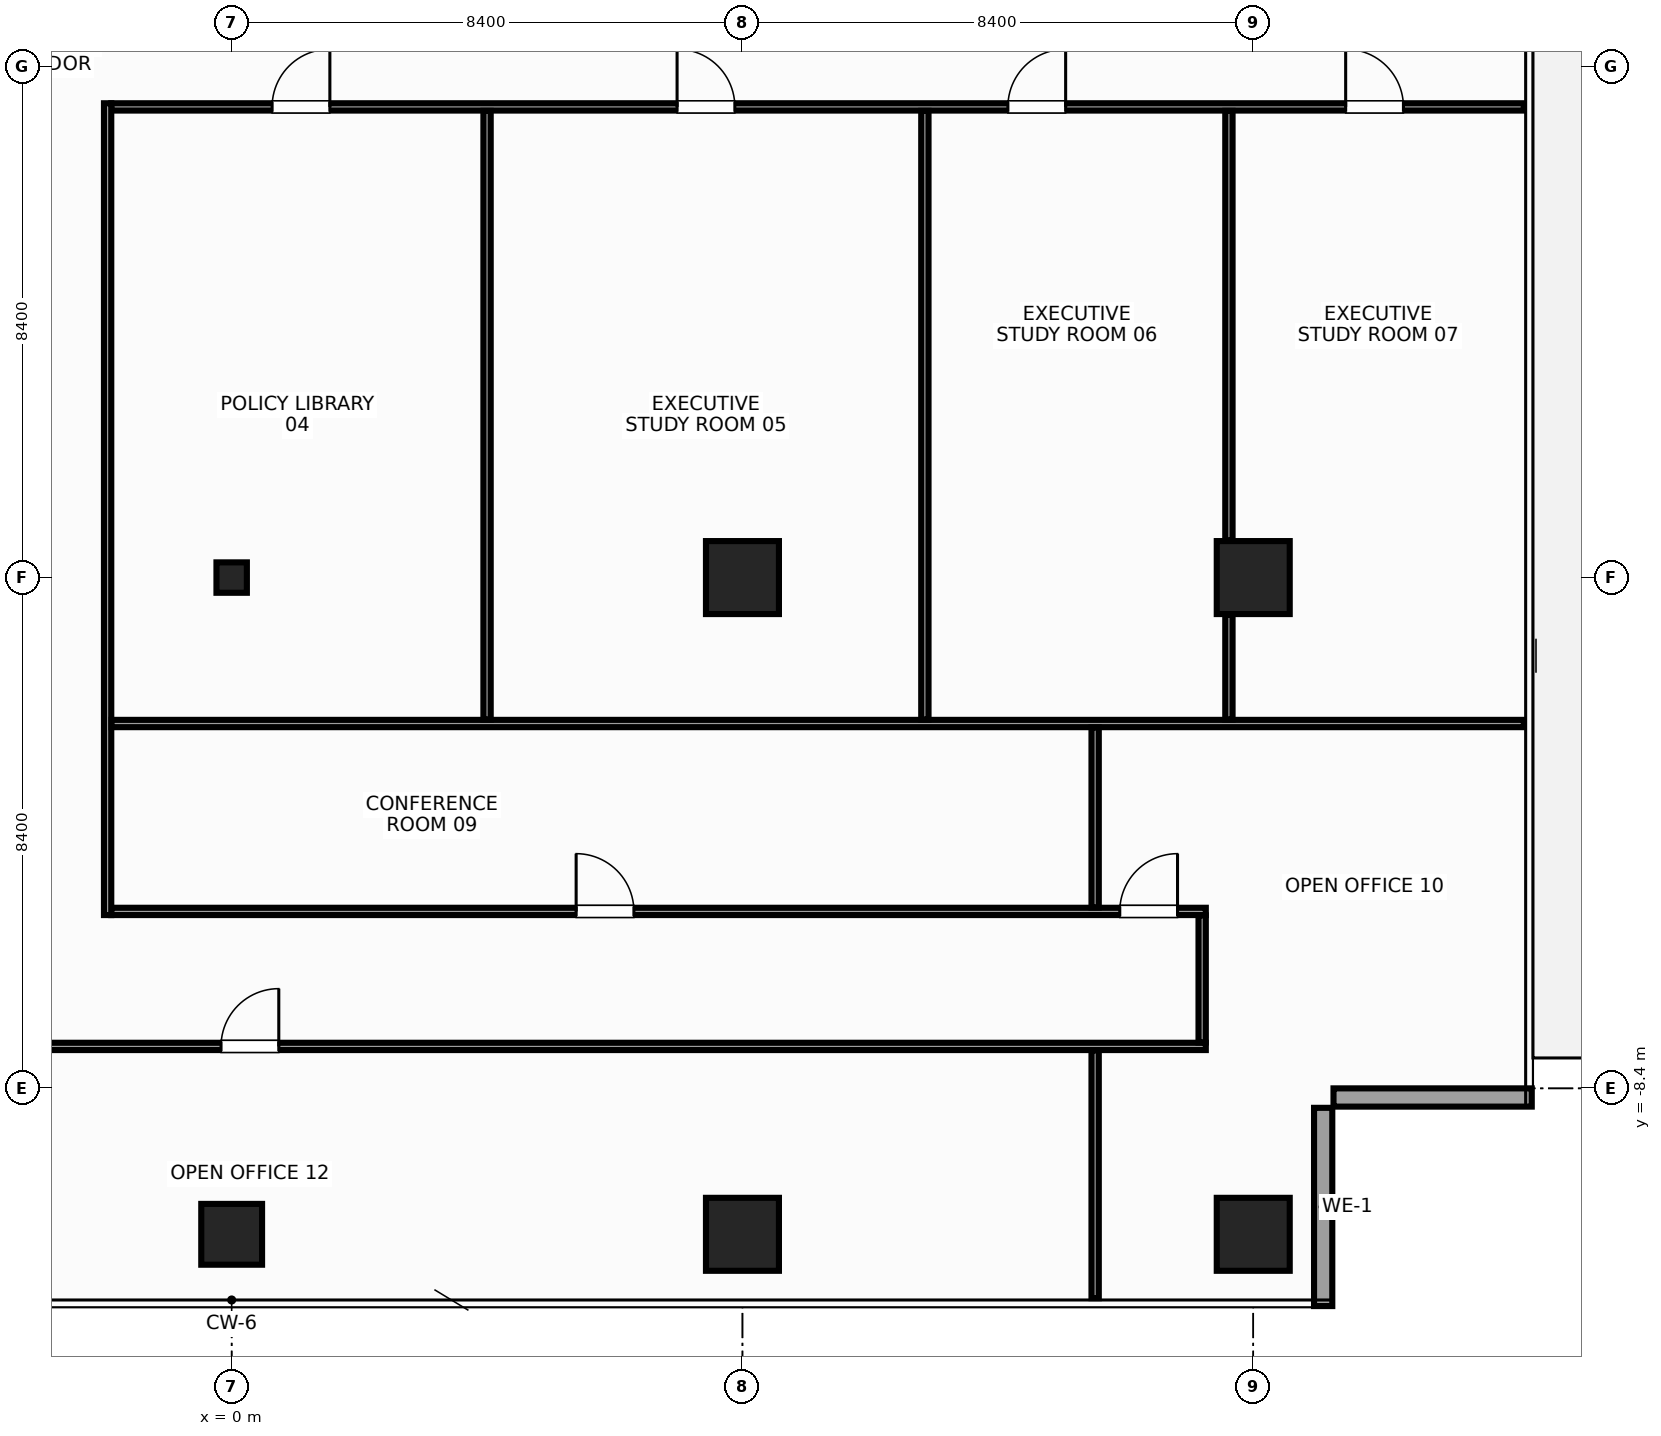
"""IFC4 building model, lengths in metres.
Left out: names, types, materials, properties, quantities, classifications, styles, units other than length and angle.
Written with IfcOpenShell. Run it as: python <this file> out.ifc"""

import sys

from ifc_helpers import new_model, si_unit, direction, frame, frame_2d, origin, origin_with_axes, origin_2d, place, context, subcontext, project, spatial, rectangle, hollow_rectangle, extrude, source, transform, mapped, element, fill, save


model = new_model("IFC4")
c1 = context("Model", 3, precision=1e-05, world=origin(), true_north=direction((0.0, 1.0)))
c2 = subcontext(c1, "Body", "Model", "MODEL_VIEW")
j1 = project(units=[si_unit("LENGTHUNIT", "METRE"), si_unit("PLANEANGLEUNIT", "RADIAN")], contexts=[c1])
p1 = place(None, origin())
s1 = spatial("IfcSite", under=j1, at=p1, CompositionType="ELEMENT")
p2 = place(p1, origin())
s2 = spatial("IfcBuilding", under=s1, at=p2, CompositionType="ELEMENT")
p3 = place(p2, frame((0.0, 0.0, 272.0)))
s3 = spatial("IfcBuildingStorey", under=s2, at=p3, CompositionType="ELEMENT", Elevation=272.0)
m1 = source(origin(), c2, "Body", "SweptSolid", [
    extrude(rectangle(XDim=1.2, YDim=1.2, at=origin_2d()), origin(), (0.0, 0.0, 1.0), 3.6),
])
for number, where, z_axis, x_axis in (
    (1, (16.8, -10.8, 0.0), (0.0, 0.0, 1.0), (1.0, 0.0, 0.0)),
    (2, (16.8, 0.0, 0.0), (0.0, 0.0, 1.0), (1.0, 0.0, 0.0)),
    (3, (8.4, 0.0, 0.0), (0.0, 0.0, 1.0), (1.0, 0.0, 0.0)),
    (4, (8.4, -10.8, 0.0), (0.0, 0.0, 1.0), (1.0, 0.0, 0.0)),
):
    element("IfcColumn", number, at=place(p3, frame(where, z_axis=z_axis, x_axis=x_axis)), inside=s3, PredefinedType="COLUMN", context=c2, shape_type="MappedRepresentation", body=[
        mapped(m1, transform((0.0, 0.0, 0.0), x_axis=(1.0, 0.0, 0.0), y_axis=(0.0, 1.0, 0.0), z_axis=(0.0, 0.0, 1.0), scale=1.0)),
    ])
m2 = source(origin(), c2, "Body", "SweptSolid", [
    extrude(rectangle(XDim=1.0, YDim=1.0, at=origin_2d()), origin(), (0.0, 0.0, 1.0), 3.6),
])
p4 = place(p3, frame((0.0, -10.8, 0.0), z_axis=(0.0, 0.0, 1.0), x_axis=(1.0, 0.0, 0.0)))
e5 = element("IfcColumn", 5, at=p4, inside=s3, PredefinedType="COLUMN", context=c2, shape_type="MappedRepresentation", body=[
    mapped(m2, transform((0.0, 0.0, 0.0), x_axis=(1.0, 0.0, 0.0), y_axis=(0.0, 1.0, 0.0), z_axis=(0.0, 0.0, 1.0), scale=1.0)),
])
m3 = source(origin(), c2, "Body", "SweptSolid", [
    extrude(hollow_rectangle(XDim=0.5, YDim=0.5, WallThickness=0.025, at=origin_2d()), origin(), (0.0, 0.0, 1.0), 3.6),
])
p5 = place(p3, origin_with_axes())
e6 = element("IfcColumn", 6, at=p5, inside=s3, PredefinedType="COLUMN", context=c2, shape_type="MappedRepresentation", body=[
    mapped(m3, transform((0.0, 0.0, 0.0), x_axis=(1.0, 0.0, 0.0), y_axis=(0.0, 1.0, 0.0), z_axis=(0.0, 0.0, 1.0), scale=1.0)),
])
m4 = source(origin(), c2, "Body", "SweptSolid", [
    extrude(rectangle(XDim=3.26, YDim=0.3, at=frame_2d((1.63, 0.0))), origin(), (0.0, 0.0, 1.0), 2.75),
])
p6 = place(p3, frame((17.95, -11.98, 0.0), z_axis=(0.0, 0.0, 1.0), x_axis=(0.0, 1.0, 0.0)))
e7 = element("IfcWall", 7, at=p6, inside=s3, PredefinedType="STANDARD", context=c2, shape_type="MappedRepresentation", body=[
    mapped(m4, transform((0.0, 0.0, 0.0), x_axis=(1.0, 0.0, 0.0), y_axis=(0.0, 1.0, 0.0), z_axis=(0.0, 0.0, 1.0), scale=1.0)),
])
m5 = source(origin(), c2, "Body", "SweptSolid", [
    extrude(rectangle(XDim=3.26, YDim=0.3, at=frame_2d((1.63, 0.0))), origin(), (0.0, 0.0, 1.0), 2.75),
])
p7 = place(p3, frame((18.12, -8.55, 0.0), z_axis=(0.0, 0.0, 1.0), x_axis=(1.0, 0.0, 0.0)))
e8 = element("IfcWall", 8, at=p7, inside=s3, PredefinedType="STANDARD", context=c2, shape_type="MappedRepresentation", body=[
    mapped(m5, transform((0.0, 0.0, 0.0), x_axis=(1.0, 0.0, 0.0), y_axis=(0.0, 1.0, 0.0), z_axis=(0.0, 0.0, 1.0), scale=1.0)),
])
m6 = source(origin(), c2, "Body", "SweptSolid", [
    extrude(rectangle(XDim=23.23, YDim=0.12, at=frame_2d((11.615, 0.0))), origin(), (0.0, 0.0, 1.0), 2.755),
])
p8 = place(p3, frame((-1.98, 7.74, 0.0), z_axis=(0.0, 0.0, 1.0), x_axis=(1.0, 0.0, 0.0)))
e9 = element("IfcWall", 9, at=p8, inside=s3, PredefinedType="PARTITIONING", context=c2, shape_type="MappedRepresentation", body=[
    mapped(m6, transform((0.0, 0.0, 0.0), x_axis=(1.0, 0.0, 0.0), y_axis=(0.0, 1.0, 0.0), z_axis=(0.0, 0.0, 1.0), scale=1.0)),
])
p9 = place(p8, frame((2.645, 0.0, 0.0)))
e10 = element("IfcOpeningElement", 10, at=p9, cuts=e9, PredefinedType="OPENING", context=c2, shape_type="SweptSolid", body=[
    extrude(rectangle(XDim=0.95, YDim=2.15, at=frame_2d((0.475, 1.075))), frame((0.0, 0.072, 0.0), z_axis=(0.0, -1.0, 0.0), x_axis=(1.0, 0.0, 0.0)), (0.0, 0.0, 1.0), 0.144),
])
p10 = place(p8, frame((9.305, 0.0, 0.0)))
e11 = element("IfcOpeningElement", 11, at=p10, cuts=e9, PredefinedType="OPENING", context=c2, shape_type="SweptSolid", body=[
    extrude(rectangle(XDim=0.95, YDim=2.15, at=frame_2d((0.475, 1.075))), frame((0.0, 0.072, 0.0), z_axis=(0.0, -1.0, 0.0), x_axis=(1.0, 0.0, 0.0)), (0.0, 0.0, 1.0), 0.144),
])
p11 = place(p8, frame((14.745, 0.0, 0.0)))
e12 = element("IfcOpeningElement", 12, at=p11, cuts=e9, PredefinedType="OPENING", context=c2, shape_type="SweptSolid", body=[
    extrude(rectangle(XDim=0.95, YDim=2.15, at=frame_2d((0.475, 1.075))), frame((0.0, 0.072, 0.0), z_axis=(0.0, -1.0, 0.0), x_axis=(1.0, 0.0, 0.0)), (0.0, 0.0, 1.0), 0.144),
])
p12 = place(p8, frame((20.3, 0.0, 0.0)))
e13 = element("IfcOpeningElement", 13, at=p12, cuts=e9, PredefinedType="OPENING", context=c2, shape_type="SweptSolid", body=[
    extrude(rectangle(XDim=0.95, YDim=2.15, at=frame_2d((0.475, 1.075))), frame((0.0, 0.072, 0.0), z_axis=(0.0, -1.0, 0.0), x_axis=(1.0, 0.0, 0.0)), (0.0, 0.0, 1.0), 0.144),
])
m7 = source(origin(), c2, "Body", "SweptSolid", [
    extrude(rectangle(XDim=18.0, YDim=0.12, at=frame_2d((9.0, 0.0))), origin(), (0.0, 0.0, 1.0), 2.755),
])
p13 = place(p3, frame((-1.98, -5.49, 0.0), z_axis=(0.0, 0.0, 1.0), x_axis=(1.0, 0.0, 0.0)))
e14 = element("IfcWall", 14, at=p13, inside=s3, PredefinedType="PARTITIONING", context=c2, shape_type="MappedRepresentation", body=[
    mapped(m7, transform((0.0, 0.0, 0.0), x_axis=(1.0, 0.0, 0.0), y_axis=(0.0, 1.0, 0.0), z_axis=(0.0, 0.0, 1.0), scale=1.0)),
])
p14 = place(p13, frame((7.645, 0.0, 0.0)))
e15 = element("IfcOpeningElement", 15, at=p14, cuts=e14, PredefinedType="OPENING", context=c2, shape_type="SweptSolid", body=[
    extrude(rectangle(XDim=0.95, YDim=2.15, at=frame_2d((0.475, 1.075))), frame((0.0, 0.072, 0.0), z_axis=(0.0, -1.0, 0.0), x_axis=(1.0, 0.0, 0.0)), (0.0, 0.0, 1.0), 0.144),
])
p15 = place(p13, frame((16.585, 0.0, 0.0)))
e16 = element("IfcOpeningElement", 16, at=p15, cuts=e14, PredefinedType="OPENING", context=c2, shape_type="SweptSolid", body=[
    extrude(rectangle(XDim=0.95, YDim=2.15, at=frame_2d((0.475, 1.075))), frame((0.0, 0.072, 0.0), z_axis=(0.0, -1.0, 0.0), x_axis=(1.0, 0.0, 0.0)), (0.0, 0.0, 1.0), 0.144),
])
m8 = source(origin(), c2, "Body", "SweptSolid", [
    extrude(rectangle(XDim=32.04, YDim=0.12, at=frame_2d((16.02, 0.0))), origin(), (0.0, 0.0, 1.0), 2.755),
])
p16 = place(p3, frame((-16.02, -7.71, 0.0), z_axis=(0.0, 0.0, 1.0), x_axis=(1.0, 0.0, 0.0)))
e17 = element("IfcWall", 17, at=p16, inside=s3, PredefinedType="PARTITIONING", context=c2, shape_type="MappedRepresentation", body=[
    mapped(m8, transform((0.0, 0.0, 0.0), x_axis=(1.0, 0.0, 0.0), y_axis=(0.0, 1.0, 0.0), z_axis=(0.0, 0.0, 1.0), scale=1.0)),
])
p17 = place(p16, frame((15.845, 0.0, 0.0)))
e18 = element("IfcOpeningElement", 18, at=p17, cuts=e17, PredefinedType="OPENING", context=c2, shape_type="SweptSolid", body=[
    extrude(rectangle(XDim=0.95, YDim=2.15, at=frame_2d((0.475, 1.075))), frame((0.0, 0.072, 0.0), z_axis=(0.0, -1.0, 0.0), x_axis=(1.0, 0.0, 0.0)), (0.0, 0.0, 1.0), 0.144),
])
m9 = source(origin(), c2, "Body", "SweptSolid", [
    extrude(rectangle(XDim=13.35, YDim=0.12, at=frame_2d((6.675, 0.0))), origin(), (0.0, 0.0, 1.0), 2.655),
])
p18 = place(p3, frame((-2.04, -5.55, 0.0), z_axis=(0.0, 0.0, 1.0), x_axis=(0.0, 1.0, 0.0)))
e19 = element("IfcWall", 19, at=p18, inside=s3, PredefinedType="PARTITIONING", context=c2, shape_type="MappedRepresentation", body=[
    mapped(m9, transform((0.0, 0.0, 0.0), x_axis=(1.0, 0.0, 0.0), y_axis=(0.0, 1.0, 0.0), z_axis=(0.0, 0.0, 1.0), scale=1.0)),
])
m10 = source(origin(), c2, "Body", "SweptSolid", [
    extrude(rectangle(XDim=2.09, YDim=0.12, at=frame_2d((1.045, 0.0))), origin(), (0.0, 0.0, 1.0), 3.37),
])
p19 = place(p3, frame((15.96, -7.645, 0.0), z_axis=(0.0, 0.0, 1.0), x_axis=(0.0, 1.0, 0.0)))
e20 = element("IfcWall", 20, at=p19, inside=s3, PredefinedType="PARTITIONING", context=c2, shape_type="MappedRepresentation", body=[
    mapped(m10, transform((0.0, 0.0, 0.0), x_axis=(1.0, 0.0, 0.0), y_axis=(0.0, 1.0, 0.0), z_axis=(0.0, 0.0, 1.0), scale=1.0)),
])
m11 = source(origin(), c2, "Body", "SweptSolid", [
    extrude(rectangle(XDim=23.225, YDim=0.12, at=frame_2d((11.613, 0.0))), origin(), (0.0, 0.0, 1.0), 2.755),
])
p20 = place(p3, frame((-1.975, -2.4, 0.0), z_axis=(0.0, 0.0, 1.0), x_axis=(1.0, 0.0, 0.0)))
e21 = element("IfcWall", 21, at=p20, inside=s3, PredefinedType="PARTITIONING", context=c2, shape_type="MappedRepresentation", body=[
    mapped(m11, transform((0.0, 0.0, 0.0), x_axis=(1.0, 0.0, 0.0), y_axis=(0.0, 1.0, 0.0), z_axis=(0.0, 0.0, 1.0), scale=1.0)),
])
m12 = source(origin(), c2, "Body", "SweptSolid", [
    extrude(rectangle(XDim=10.01, YDim=0.12, at=frame_2d((5.005, 0.0))), origin(), (0.0, 0.0, 1.0), 2.655),
])
for number, where, z_axis, x_axis in (
    (22, (4.2, -2.335, 0.0), (0.0, 0.0, 1.0), (0.0, 1.0, 0.0)),
    (23, (11.4, -2.335, 0.0), (0.0, 0.0, 1.0), (0.0, 1.0, 0.0)),
):
    element("IfcWall", number, at=place(p3, frame(where, z_axis=z_axis, x_axis=x_axis)), inside=s3, PredefinedType="PARTITIONING", context=c2, shape_type="MappedRepresentation", body=[
        mapped(m12, transform((0.0, 0.0, 0.0), x_axis=(1.0, 0.0, 0.0), y_axis=(0.0, 1.0, 0.0), z_axis=(0.0, 0.0, 1.0), scale=1.0)),
    ])
m13 = source(origin(), c2, "Body", "SweptSolid", [
    extrude(rectangle(XDim=1.725, YDim=0.12, at=frame_2d((0.862, 0.0))), origin(), (0.0, 0.0, 1.0), 3.37),
])
p21 = place(p3, frame((16.4, -2.335, 0.0), z_axis=(0.0, 0.0, 1.0), x_axis=(0.0, 1.0, 0.0)))
e24 = element("IfcWall", 24, at=p21, inside=s3, PredefinedType="PARTITIONING", context=c2, shape_type="MappedRepresentation", body=[
    mapped(m13, transform((0.0, 0.0, 0.0), x_axis=(1.0, 0.0, 0.0), y_axis=(0.0, 1.0, 0.0), z_axis=(0.0, 0.0, 1.0), scale=1.0)),
])
m14 = source(origin(), c2, "Body", "SweptSolid", [
    extrude(rectangle(XDim=7.065, YDim=0.12, at=frame_2d((3.532, 0.0))), origin(), (0.0, 0.0, 1.0), 2.655),
])
p22 = place(p3, frame((16.4, 0.61, 0.0), z_axis=(0.0, 0.0, 1.0), x_axis=(0.0, 1.0, 0.0)))
e25 = element("IfcWall", 25, at=p22, inside=s3, PredefinedType="PARTITIONING", context=c2, shape_type="MappedRepresentation", body=[
    mapped(m14, transform((0.0, 0.0, 0.0), x_axis=(1.0, 0.0, 0.0), y_axis=(0.0, 1.0, 0.0), z_axis=(0.0, 0.0, 1.0), scale=1.0)),
])
m15 = source(origin(), c2, "Body", "SweptSolid", [
    extrude(rectangle(XDim=4.075, YDim=0.12, at=frame_2d((2.038, 0.0))), origin(), (0.0, 0.0, 1.0), 2.905),
])
p23 = place(p3, frame((14.2, -11.85, 0.0), z_axis=(0.0, 0.0, 1.0), x_axis=(0.0, 1.0, 0.0)))
e26 = element("IfcWall", 26, at=p23, inside=s3, PredefinedType="PARTITIONING", context=c2, shape_type="MappedRepresentation", body=[
    mapped(m15, transform((0.0, 0.0, 0.0), x_axis=(1.0, 0.0, 0.0), y_axis=(0.0, 1.0, 0.0), z_axis=(0.0, 0.0, 1.0), scale=1.0)),
])
m16 = source(origin(), c2, "Body", "SweptSolid", [
    extrude(rectangle(XDim=2.96, YDim=0.12, at=frame_2d((1.48, 0.0))), origin(), (0.0, 0.0, 1.0), 3.37),
])
p24 = place(p3, frame((14.2, -5.425, 0.0), z_axis=(0.0, 0.0, 1.0), x_axis=(0.0, 1.0, 0.0)))
e27 = element("IfcWall", 27, at=p24, inside=s3, PredefinedType="PARTITIONING", context=c2, shape_type="MappedRepresentation", body=[
    mapped(m16, transform((0.0, 0.0, 0.0), x_axis=(1.0, 0.0, 0.0), y_axis=(0.0, 1.0, 0.0), z_axis=(0.0, 0.0, 1.0), scale=1.0)),
])
m17 = source(origin(), c2, "Body", "SweptSolid", [
    extrude(rectangle(XDim=0.95, YDim=2.15, at=frame_2d((0.475, 1.075))), frame((0.0, 0.025, 0.0), z_axis=(0.0, -1.0, 0.0), x_axis=(1.0, 0.0, 0.0)), (0.0, 0.0, 1.0), 0.05),
])
p25 = place(p9, origin())
e28 = element("IfcDoor", 28, at=p25, inside=s3, OperationType="SINGLE_SWING_RIGHT", PredefinedType="DOOR", context=c2, shape_type="MappedRepresentation", body=[
    mapped(m17, transform((0.0, 0.0, 0.0), x_axis=(1.0, 0.0, 0.0), y_axis=(0.0, 1.0, 0.0), z_axis=(0.0, 0.0, 1.0), scale=1.0)),
])
fill(e10, e28)
p26 = place(p10, origin())
e29 = element("IfcDoor", 29, at=p26, inside=s3, OperationType="SINGLE_SWING_LEFT", PredefinedType="DOOR", context=c2, shape_type="MappedRepresentation", body=[
    mapped(m17, transform((0.0, 0.0, 0.0), x_axis=(1.0, 0.0, 0.0), y_axis=(0.0, 1.0, 0.0), z_axis=(0.0, 0.0, 1.0), scale=1.0)),
])
fill(e11, e29)
p27 = place(p11, origin())
e30 = element("IfcDoor", 30, at=p27, inside=s3, OperationType="SINGLE_SWING_RIGHT", PredefinedType="DOOR", context=c2, shape_type="MappedRepresentation", body=[
    mapped(m17, transform((0.0, 0.0, 0.0), x_axis=(1.0, 0.0, 0.0), y_axis=(0.0, 1.0, 0.0), z_axis=(0.0, 0.0, 1.0), scale=1.0)),
])
fill(e12, e30)
p28 = place(p12, origin())
e31 = element("IfcDoor", 31, at=p28, inside=s3, OperationType="SINGLE_SWING_LEFT", PredefinedType="DOOR", context=c2, shape_type="MappedRepresentation", body=[
    mapped(m17, transform((0.0, 0.0, 0.0), x_axis=(1.0, 0.0, 0.0), y_axis=(0.0, 1.0, 0.0), z_axis=(0.0, 0.0, 1.0), scale=1.0)),
])
fill(e13, e31)
p29 = place(p14, origin())
e32 = element("IfcDoor", 32, at=p29, inside=s3, OperationType="SINGLE_SWING_LEFT", PredefinedType="DOOR", context=c2, shape_type="MappedRepresentation", body=[
    mapped(m17, transform((0.0, 0.0, 0.0), x_axis=(1.0, 0.0, 0.0), y_axis=(0.0, 1.0, 0.0), z_axis=(0.0, 0.0, 1.0), scale=1.0)),
])
fill(e15, e32)
p30 = place(p15, origin())
e33 = element("IfcDoor", 33, at=p30, inside=s3, OperationType="SINGLE_SWING_RIGHT", PredefinedType="DOOR", context=c2, shape_type="MappedRepresentation", body=[
    mapped(m17, transform((0.0, 0.0, 0.0), x_axis=(1.0, 0.0, 0.0), y_axis=(0.0, 1.0, 0.0), z_axis=(0.0, 0.0, 1.0), scale=1.0)),
])
fill(e16, e33)
p31 = place(p17, origin())
e34 = element("IfcDoor", 34, at=p31, inside=s3, OperationType="SINGLE_SWING_RIGHT", PredefinedType="DOOR", context=c2, shape_type="MappedRepresentation", body=[
    mapped(m17, transform((0.0, 0.0, 0.0), x_axis=(1.0, 0.0, 0.0), y_axis=(0.0, 1.0, 0.0), z_axis=(0.0, 0.0, 1.0), scale=1.0)),
])
fill(e18, e34)
save(model, sys.argv[1])
